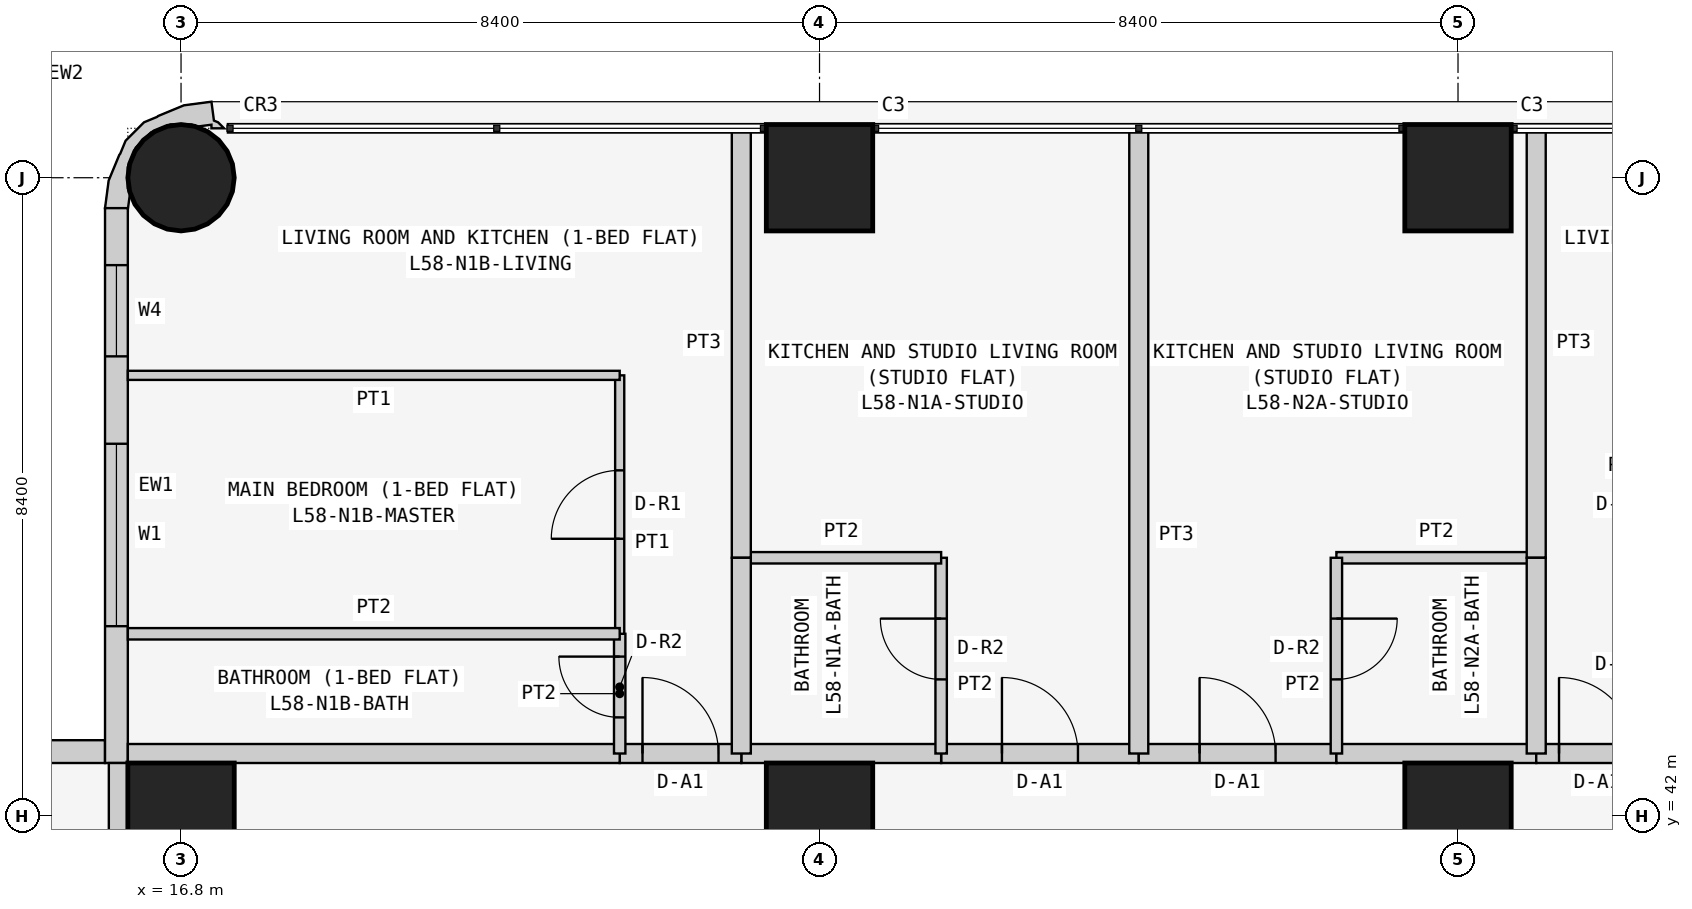
"""IFC4 building model, lengths in metres.
Left out: names, types, materials, properties, quantities, classifications, styles, units other than length and angle.
Written with IfcOpenShell. Run it as: python <this file> out.ifc"""

import sys

from ifc_helpers import new_model, si_unit, direction, frame, frame_2d, origin, origin_2d, place, context, subcontext, project, spatial, polyline, rectangle, circle, outline, extrude, element, fill, save


model = new_model("IFC4")
c1 = context("Model", 3, precision=1e-05, world=origin(), true_north=direction((0.0, 1.0)))
c2 = subcontext(c1, "Body", "Model", "MODEL_VIEW")
j1 = project(units=[si_unit("LENGTHUNIT", "METRE"), si_unit("PLANEANGLEUNIT", "RADIAN")], contexts=[c1])
p1 = place(None, origin())
s1 = spatial("IfcSite", under=j1, at=p1, CompositionType="ELEMENT")
p2 = place(p1, origin())
s2 = spatial("IfcBuilding", under=s1, at=p2, CompositionType="ELEMENT")
p3 = place(p2, frame((0.0, 0.0, 222.9)))
s3 = spatial("IfcBuildingStorey", under=s2, at=p3, CompositionType="ELEMENT", Elevation=222.9)
p4 = place(p3, frame((16.8, 42.0, 0.0), z_axis=(0.0, 0.0, 1.0), x_axis=(1.0, 0.0, 0.0)))
e1 = element("IfcColumn", 1, at=p4, inside=s3, PredefinedType="COLUMN", context=c2, shape_type="SweptSolid", body=[
    extrude(rectangle(XDim=1.4, YDim=1.4, at=origin_2d()), origin(), (0.0, 0.0, 1.0), 3.6),
])
p5 = place(p3, frame((16.8, 50.4, 0.0), z_axis=(0.0, 0.0, 1.0), x_axis=(1.0, 0.0, 0.0)))
e2 = element("IfcColumn", 2, at=p5, inside=s3, PredefinedType="COLUMN", context=c2, shape_type="SweptSolid", body=[
    extrude(circle(Radius=0.7, at=origin_2d()), origin(), (0.0, 0.0, 1.0), 3.6),
])
for number, where, z_axis, x_axis in (
    (3, (25.2, 42.0, 0.0), (0.0, 0.0, 1.0), (1.0, 0.0, 0.0)),
    (4, (25.2, 50.4, 0.0), (0.0, 0.0, 1.0), (1.0, 0.0, 0.0)),
    (5, (33.6, 42.0, 0.0), (0.0, 0.0, 1.0), (1.0, 0.0, 0.0)),
    (6, (33.6, 50.4, 0.0), (0.0, 0.0, 1.0), (1.0, 0.0, 0.0)),
):
    element("IfcColumn", number, at=place(p3, frame(where, z_axis=z_axis, x_axis=x_axis)), inside=s3, PredefinedType="COLUMN", context=c2, shape_type="SweptSolid", body=[
        extrude(rectangle(XDim=1.4, YDim=1.4, at=origin_2d()), origin(), (0.0, 0.0, 1.0), 3.6),
    ])
p6 = place(p3, frame((15.8, 42.85, 0.0), z_axis=(0.0, 0.0, 1.0), x_axis=(-1.0, 0.0, 0.0)))
e7 = element("IfcWall", 7, at=p6, inside=s3, PredefinedType="SOLIDWALL", context=c2, shape_type="SweptSolid", body=[
    extrude(rectangle(XDim=15.4, YDim=0.3, at=frame_2d((7.7, 0.0))), origin(), (0.0, 0.0, 1.0), 3.45),
])
p7 = place(p6, frame((1.2, 0.0, 0.9)))
e8 = element("IfcOpeningElement", 8, at=p7, cuts=e7, PredefinedType="OPENING", context=c2, shape_type="SweptSolid", body=[
    extrude(rectangle(XDim=1.8, YDim=1.5, at=frame_2d((0.9, 0.75))), frame((0.0, 0.16, 0.0), z_axis=(0.0, -1.0, 0.0), x_axis=(1.0, 0.0, 0.0)), (0.0, 0.0, 1.0), 0.32),
])
p8 = place(p6, frame((4.95, 0.0, 1.5)))
e9 = element("IfcOpeningElement", 9, at=p8, cuts=e7, PredefinedType="OPENING", context=c2, shape_type="SweptSolid", body=[
    extrude(rectangle(XDim=0.9, YDim=0.7, at=frame_2d((0.45, 0.35))), frame((0.0, 0.16, 0.0), z_axis=(0.0, -1.0, 0.0), x_axis=(1.0, 0.0, 0.0)), (0.0, 0.0, 1.0), 0.32),
])
p9 = place(p6, frame((8.5, 0.0, 0.9)))
e10 = element("IfcOpeningElement", 10, at=p9, cuts=e7, PredefinedType="OPENING", context=c2, shape_type="SweptSolid", body=[
    extrude(rectangle(XDim=1.8, YDim=1.5, at=frame_2d((0.9, 0.75))), frame((0.0, 0.16, 0.0), z_axis=(0.0, -1.0, 0.0), x_axis=(1.0, 0.0, 0.0)), (0.0, 0.0, 1.0), 0.32),
])
p10 = place(p6, frame((12.5, 0.0, 0.0)))
e11 = element("IfcOpeningElement", 11, at=p10, cuts=e7, PredefinedType="OPENING", context=c2, shape_type="SweptSolid", body=[
    extrude(rectangle(XDim=0.9, YDim=2.4, at=frame_2d((0.45, 1.2))), frame((0.0, 0.16, 0.0), z_axis=(0.0, -1.0, 0.0), x_axis=(1.0, 0.0, 0.0)), (0.0, 0.0, 1.0), 0.32),
])
p11 = place(p6, frame((13.5, 0.0, 0.9)))
e12 = element("IfcOpeningElement", 12, at=p11, cuts=e7, PredefinedType="OPENING", context=c2, shape_type="SweptSolid", body=[
    extrude(rectangle(XDim=1.2, YDim=1.5, at=frame_2d((0.6, 0.75))), frame((0.0, 0.16, 0.0), z_axis=(0.0, -1.0, 0.0), x_axis=(1.0, 0.0, 0.0)), (0.0, 0.0, 1.0), 0.32),
])
p12 = place(p3, frame((15.95, 50.0, 0.0), z_axis=(0.0, 0.0, 1.0), x_axis=(0.0, -1.0, 0.0)))
e13 = element("IfcWall", 13, at=p12, inside=s3, PredefinedType="SOLIDWALL", context=c2, shape_type="SweptSolid", body=[
    extrude(rectangle(XDim=7.3, YDim=0.3, at=frame_2d((3.65, 0.0))), origin(), (0.0, 0.0, 1.0), 3.45),
])
p13 = place(p12, frame((3.1, 0.0, 0.9)))
e14 = element("IfcOpeningElement", 14, at=p13, cuts=e13, PredefinedType="OPENING", context=c2, shape_type="SweptSolid", body=[
    extrude(rectangle(XDim=2.4, YDim=1.5, at=frame_2d((1.2, 0.75))), frame((0.0, 0.16, 0.0), z_axis=(0.0, -1.0, 0.0), x_axis=(1.0, 0.0, 0.0)), (0.0, 0.0, 1.0), 0.32),
])
p14 = place(p12, frame((0.75, 0.0, 0.9)))
e15 = element("IfcOpeningElement", 15, at=p14, cuts=e13, PredefinedType="OPENING", context=c2, shape_type="SweptSolid", body=[
    extrude(rectangle(XDim=1.2, YDim=1.5, at=frame_2d((0.6, 0.75))), frame((0.0, 0.16, 0.0), z_axis=(0.0, -1.0, 0.0), x_axis=(1.0, 0.0, 0.0)), (0.0, 0.0, 1.0), 0.32),
])
p15 = place(p3, frame((17.312, 50.988, 0.0), z_axis=(0.0, 0.0, 1.0), x_axis=(-0.439933741929, 0.898030234854, 0.0)))
e16 = element("IfcWall", 16, at=p15, inside=s3, PredefinedType="SOLIDWALL", context=c2, shape_type="SweptSolid", body=[
    extrude(outline(polyline([(0.138, -0.039), (0.182, -0.0), (0.419, -0.08), (0.536, 0.266), (0.559, 0.631), (0.555, 0.651), (0.566, 0.836), (0.456, 1.159), (0.333, 1.298), (0.324, 1.316), (0.082, 1.591), (-0.222, 1.793), (-0.39, 1.541), (-0.372, 1.532), (-0.195, 1.414), (-0.12, 1.41), (0.131, 1.287), (0.315, 1.078), (0.406, 0.814), (0.388, 0.536), (0.265, 0.285), (0.209, 0.236), (0.148, 0.053), (0.105, 0.074), (0.032, -0.076), (0.138, -0.039)])), origin(), (0.0, 0.0, 1.0), 3.45),
])
p16 = place(p3, frame((26.8, 42.825, 0.0), z_axis=(0.0, 0.0, 1.0), x_axis=(1.0, 0.0, 0.0)))
e17 = element("IfcWall", 17, at=p16, inside=s3, PredefinedType="PARTITIONING", context=c2, shape_type="SweptSolid", body=[
    extrude(rectangle(XDim=2.6, YDim=0.25, at=frame_2d((1.3, 0.0))), origin(), (0.0, 0.0, 1.0), 3.45),
])
p17 = place(p16, frame((0.8, 0.0, 0.0)))
e18 = element("IfcOpeningElement", 18, at=p17, cuts=e17, PredefinedType="OPENING", context=c2, shape_type="SweptSolid", body=[
    extrude(rectangle(XDim=1.0, YDim=2.1, at=frame_2d((0.5, 1.05))), frame((0.0, 0.135, 0.0), z_axis=(0.0, -1.0, 0.0), x_axis=(1.0, 0.0, 0.0)), (0.0, 0.0, 1.0), 0.27),
])
p18 = place(p3, frame((24.171, 42.825, 0.0), z_axis=(0.0, 0.0, 1.0), x_axis=(1.0, 0.0, 0.0)))
e19 = element("IfcWall", 19, at=p18, inside=s3, PredefinedType="PARTITIONING", context=c2, shape_type="SweptSolid", body=[
    extrude(rectangle(XDim=2.629, YDim=0.25, at=frame_2d((1.314, 0.0))), origin(), (0.0, 0.0, 1.0), 3.45),
])
p19 = place(p3, frame((22.571, 42.825, 0.0), z_axis=(0.0, 0.0, 1.0), x_axis=(1.0, 0.0, 0.0)))
e20 = element("IfcWall", 20, at=p19, inside=s3, PredefinedType="PARTITIONING", context=c2, shape_type="SweptSolid", body=[
    extrude(rectangle(XDim=1.6, YDim=0.25, at=frame_2d((0.8, 0.0))), origin(), (0.0, 0.0, 1.0), 3.45),
])
p20 = place(p19, frame((0.3, 0.0, 0.0)))
e21 = element("IfcOpeningElement", 21, at=p20, cuts=e20, PredefinedType="OPENING", context=c2, shape_type="SweptSolid", body=[
    extrude(rectangle(XDim=1.0, YDim=2.1, at=frame_2d((0.5, 1.05))), frame((0.0, 0.135, 0.0), z_axis=(0.0, -1.0, 0.0), x_axis=(1.0, 0.0, 0.0)), (0.0, 0.0, 1.0), 0.27),
])
p21 = place(p3, frame((16.1, 42.825, 0.0), z_axis=(0.0, 0.0, 1.0), x_axis=(1.0, 0.0, 0.0)))
e22 = element("IfcWall", 22, at=p21, inside=s3, PredefinedType="PARTITIONING", context=c2, shape_type="SweptSolid", body=[
    extrude(rectangle(XDim=6.471, YDim=0.25, at=frame_2d((3.235, 0.0))), origin(), (0.0, 0.0, 1.0), 3.45),
])
p22 = place(p3, frame((29.4, 42.825, 0.0), z_axis=(0.0, 0.0, 1.0), x_axis=(1.0, 0.0, 0.0)))
e23 = element("IfcWall", 23, at=p22, inside=s3, PredefinedType="PARTITIONING", context=c2, shape_type="SweptSolid", body=[
    extrude(rectangle(XDim=2.6, YDim=0.25, at=frame_2d((1.3, 0.0))), origin(), (0.0, 0.0, 1.0), 3.45),
])
p23 = place(p22, frame((0.8, 0.0, 0.0)))
e24 = element("IfcOpeningElement", 24, at=p23, cuts=e23, PredefinedType="OPENING", context=c2, shape_type="SweptSolid", body=[
    extrude(rectangle(XDim=1.0, YDim=2.1, at=frame_2d((0.5, 1.05))), frame((0.0, 0.135, 0.0), z_axis=(0.0, -1.0, 0.0), x_axis=(1.0, 0.0, 0.0)), (0.0, 0.0, 1.0), 0.27),
])
p24 = place(p3, frame((32.0, 42.825, 0.0), z_axis=(0.0, 0.0, 1.0), x_axis=(1.0, 0.0, 0.0)))
e25 = element("IfcWall", 25, at=p24, inside=s3, PredefinedType="PARTITIONING", context=c2, shape_type="SweptSolid", body=[
    extrude(rectangle(XDim=2.629, YDim=0.25, at=frame_2d((1.314, 0.0))), origin(), (0.0, 0.0, 1.0), 3.45),
])
p25 = place(p3, frame((34.629, 42.825, 0.0), z_axis=(0.0, 0.0, 1.0), x_axis=(1.0, 0.0, 0.0)))
e26 = element("IfcWall", 26, at=p25, inside=s3, PredefinedType="PARTITIONING", context=c2, shape_type="SweptSolid", body=[
    extrude(rectangle(XDim=1.6, YDim=0.25, at=frame_2d((0.8, 0.0))), origin(), (0.0, 0.0, 1.0), 3.45),
])
p26 = place(p25, frame((0.3, 0.0, 0.0)))
e27 = element("IfcOpeningElement", 27, at=p26, cuts=e26, PredefinedType="OPENING", context=c2, shape_type="SweptSolid", body=[
    extrude(rectangle(XDim=1.0, YDim=2.1, at=frame_2d((0.5, 1.05))), frame((0.0, 0.135, 0.0), z_axis=(0.0, -1.0, 0.0), x_axis=(1.0, 0.0, 0.0)), (0.0, 0.0, 1.0), 0.27),
])
p27 = place(p3, frame((15.975, 36.229, 0.0), z_axis=(0.0, 0.0, 1.0), x_axis=(0.0, 1.0, 0.0)))
e28 = element("IfcWall", 28, at=p27, inside=s3, PredefinedType="PARTITIONING", context=c2, shape_type="SweptSolid", body=[
    extrude(rectangle(XDim=6.471, YDim=0.25, at=frame_2d((3.235, 0.0))), origin(), (0.0, 0.0, 1.0), 3.45),
])
p28 = place(p3, frame((26.8, 42.825, 0.0), z_axis=(0.0, 0.0, 1.0), x_axis=(0.0, 1.0, 0.0)))
e29 = element("IfcWall", 29, at=p28, inside=s3, PredefinedType="PARTITIONING", context=c2, shape_type="SweptSolid", body=[
    extrude(rectangle(XDim=2.575, YDim=0.15, at=frame_2d((1.288, 0.0))), origin(), (0.0, 0.0, 1.0), 3.45),
])
p29 = place(p28, frame((0.975, 0.0, 0.0)))
e30 = element("IfcOpeningElement", 30, at=p29, cuts=e29, PredefinedType="OPENING", context=c2, shape_type="SweptSolid", body=[
    extrude(rectangle(XDim=0.8, YDim=2.1, at=frame_2d((0.4, 1.05))), frame((0.0, 0.085, 0.0), z_axis=(0.0, -1.0, 0.0), x_axis=(1.0, 0.0, 0.0)), (0.0, 0.0, 1.0), 0.17),
])
p30 = place(p3, frame((26.8, 45.4, 0.0), z_axis=(0.0, 0.0, 1.0), x_axis=(-1.0, 0.0, 0.0)))
e31 = element("IfcWall", 31, at=p30, inside=s3, PredefinedType="PARTITIONING", context=c2, shape_type="SweptSolid", body=[
    extrude(rectangle(XDim=2.629, YDim=0.15, at=frame_2d((1.314, 0.0))), origin(), (0.0, 0.0, 1.0), 3.45),
])
p31 = place(p3, frame((24.171, 45.4, 0.0), z_axis=(0.0, 0.0, 1.0), x_axis=(0.0, 1.0, 0.0)))
e32 = element("IfcWall", 32, at=p31, inside=s3, PredefinedType="PARTITIONING", context=c2, shape_type="SweptSolid", body=[
    extrude(rectangle(XDim=5.65, YDim=0.25, at=frame_2d((2.825, 0.0))), origin(), (0.0, 0.0, 1.0), 3.45),
])
p32 = place(p3, frame((29.4, 51.05, 0.0), z_axis=(0.0, 0.0, 1.0), x_axis=(0.0, -1.0, 0.0)))
e33 = element("IfcWall", 33, at=p32, inside=s3, PredefinedType="PARTITIONING", context=c2, shape_type="SweptSolid", body=[
    extrude(rectangle(XDim=8.225, YDim=0.25, at=frame_2d((4.113, 0.0))), origin(), (0.0, 0.0, 1.0), 2.848),
])
p33 = place(p3, frame((24.171, 45.4, 0.0), z_axis=(0.0, 0.0, 1.0), x_axis=(0.0, -1.0, 0.0)))
e34 = element("IfcWall", 34, at=p33, inside=s3, PredefinedType="PARTITIONING", context=c2, shape_type="SweptSolid", body=[
    extrude(rectangle(XDim=2.575, YDim=0.25, at=frame_2d((1.288, 0.0))), origin(), (0.0, 0.0, 1.0), 3.45),
])
p34 = place(p3, frame((22.571, 42.825, 0.0), z_axis=(0.0, 0.0, 1.0), x_axis=(0.0, 1.0, 0.0)))
e35 = element("IfcWall", 35, at=p34, inside=s3, PredefinedType="PARTITIONING", context=c2, shape_type="SweptSolid", body=[
    extrude(rectangle(XDim=1.575, YDim=0.15, at=frame_2d((0.788, 0.0))), origin(), (0.0, 0.0, 1.0), 3.45),
])
p35 = place(p34, frame((0.475, 0.0, 0.0)))
e36 = element("IfcOpeningElement", 36, at=p35, cuts=e35, PredefinedType="OPENING", context=c2, shape_type="SweptSolid", body=[
    extrude(rectangle(XDim=0.8, YDim=2.1, at=frame_2d((0.4, 1.05))), frame((0.0, 0.085, 0.0), z_axis=(0.0, -1.0, 0.0), x_axis=(1.0, 0.0, 0.0)), (0.0, 0.0, 1.0), 0.17),
])
p36 = place(p3, frame((22.571, 44.4, 0.0), z_axis=(0.0, 0.0, 1.0), x_axis=(0.0, 1.0, 0.0)))
e37 = element("IfcWall", 37, at=p36, inside=s3, PredefinedType="PARTITIONING", context=c2, shape_type="SweptSolid", body=[
    extrude(rectangle(XDim=3.4, YDim=0.12, at=frame_2d((1.7, 0.0))), origin(), (0.0, 0.0, 1.0), 3.45),
])
p37 = place(p36, frame((1.25, 0.0, 0.0)))
e38 = element("IfcOpeningElement", 38, at=p37, cuts=e37, PredefinedType="OPENING", context=c2, shape_type="SweptSolid", body=[
    extrude(rectangle(XDim=0.9, YDim=2.1, at=frame_2d((0.45, 1.05))), frame((0.0, 0.07, 0.0), z_axis=(0.0, -1.0, 0.0), x_axis=(1.0, 0.0, 0.0)), (0.0, 0.0, 1.0), 0.14),
])
p38 = place(p3, frame((22.571, 47.8, 0.0), z_axis=(0.0, 0.0, 1.0), x_axis=(-1.0, 0.0, 0.0)))
e39 = element("IfcWall", 39, at=p38, inside=s3, PredefinedType="PARTITIONING", context=c2, shape_type="SweptSolid", body=[
    extrude(rectangle(XDim=6.471, YDim=0.12, at=frame_2d((3.235, 0.0))), origin(), (0.0, 0.0, 1.0), 3.45),
])
p39 = place(p3, frame((22.571, 44.4, 0.0), z_axis=(0.0, 0.0, 1.0), x_axis=(-1.0, 0.0, 0.0)))
e40 = element("IfcWall", 40, at=p39, inside=s3, PredefinedType="PARTITIONING", context=c2, shape_type="SweptSolid", body=[
    extrude(rectangle(XDim=6.471, YDim=0.15, at=frame_2d((3.235, 0.0))), origin(), (0.0, 0.0, 1.0), 3.45),
])
p40 = place(p3, frame((34.629, 45.4, 0.0), z_axis=(0.0, 0.0, 1.0), x_axis=(-1.0, 0.0, 0.0)))
e41 = element("IfcWall", 41, at=p40, inside=s3, PredefinedType="PARTITIONING", context=c2, shape_type="SweptSolid", body=[
    extrude(rectangle(XDim=2.629, YDim=0.15, at=frame_2d((1.314, 0.0))), origin(), (0.0, 0.0, 1.0), 3.45),
])
p41 = place(p3, frame((32.0, 45.4, 0.0), z_axis=(0.0, 0.0, 1.0), x_axis=(0.0, -1.0, 0.0)))
e42 = element("IfcWall", 42, at=p41, inside=s3, PredefinedType="PARTITIONING", context=c2, shape_type="SweptSolid", body=[
    extrude(rectangle(XDim=2.575, YDim=0.15, at=frame_2d((1.288, 0.0))), origin(), (0.0, 0.0, 1.0), 3.45),
])
p42 = place(p41, frame((0.8, 0.0, 0.0)))
e43 = element("IfcOpeningElement", 43, at=p42, cuts=e42, PredefinedType="OPENING", context=c2, shape_type="SweptSolid", body=[
    extrude(rectangle(XDim=0.8, YDim=2.1, at=frame_2d((0.4, 1.05))), frame((0.0, 0.085, 0.0), z_axis=(0.0, -1.0, 0.0), x_axis=(1.0, 0.0, 0.0)), (0.0, 0.0, 1.0), 0.17),
])
p43 = place(p3, frame((34.629, 51.05, 0.0), z_axis=(0.0, 0.0, 1.0), x_axis=(0.0, -1.0, 0.0)))
e44 = element("IfcWall", 44, at=p43, inside=s3, PredefinedType="PARTITIONING", context=c2, shape_type="SweptSolid", body=[
    extrude(rectangle(XDim=5.65, YDim=0.25, at=frame_2d((2.825, 0.0))), origin(), (0.0, 0.0, 1.0), 3.45),
])
p44 = place(p3, frame((34.629, 45.4, 0.0), z_axis=(0.0, 0.0, 1.0), x_axis=(0.0, -1.0, 0.0)))
e45 = element("IfcWall", 45, at=p44, inside=s3, PredefinedType="PARTITIONING", context=c2, shape_type="SweptSolid", body=[
    extrude(rectangle(XDim=2.575, YDim=0.25, at=frame_2d((1.288, 0.0))), origin(), (0.0, 0.0, 1.0), 3.45),
])
p45 = place(p13, origin())
e46 = element("IfcWindow", 46, at=p45, inside=s3, PartitioningType="SINGLE_PANEL", PredefinedType="WINDOW", context=c2, shape_type="SweptSolid", body=[
    extrude(rectangle(XDim=2.4, YDim=1.5, at=frame_2d((1.2, 0.75))), frame((0.0, 0.03, 0.0), z_axis=(0.0, -1.0, 0.0), x_axis=(1.0, 0.0, 0.0)), (0.0, 0.0, 1.0), 0.06),
])
fill(e14, e46)
p46 = place(p14, origin())
e47 = element("IfcWindow", 47, at=p46, inside=s3, PartitioningType="SINGLE_PANEL", PredefinedType="WINDOW", context=c2, shape_type="SweptSolid", body=[
    extrude(rectangle(XDim=1.2, YDim=1.5, at=frame_2d((0.6, 0.75))), frame((0.0, 0.03, 0.0), z_axis=(0.0, -1.0, 0.0), x_axis=(1.0, 0.0, 0.0)), (0.0, 0.0, 1.0), 0.06),
])
fill(e15, e47)
p47 = place(p17, origin())
e48 = element("IfcDoor", 48, at=p47, inside=s3, OperationType="SINGLE_SWING_LEFT", PredefinedType="DOOR", context=c2, shape_type="SweptSolid", body=[
    extrude(rectangle(XDim=1.0, YDim=2.1, at=frame_2d((0.5, 1.05))), frame((0.0, 0.025, 0.0), z_axis=(0.0, -1.0, 0.0), x_axis=(1.0, 0.0, 0.0)), (0.0, 0.0, 1.0), 0.05),
])
fill(e18, e48)
p48 = place(p29, origin())
e49 = element("IfcDoor", 49, at=p48, inside=s3, OperationType="SINGLE_SWING_RIGHT", PredefinedType="DOOR", context=c2, shape_type="SweptSolid", body=[
    extrude(rectangle(XDim=0.8, YDim=2.1, at=frame_2d((0.4, 1.05))), frame((0.0, 0.025, 0.0), z_axis=(0.0, -1.0, 0.0), x_axis=(1.0, 0.0, 0.0)), (0.0, 0.0, 1.0), 0.05),
])
fill(e30, e49)
p49 = place(p20, origin())
e50 = element("IfcDoor", 50, at=p49, inside=s3, OperationType="SINGLE_SWING_LEFT", PredefinedType="DOOR", context=c2, shape_type="SweptSolid", body=[
    extrude(rectangle(XDim=1.0, YDim=2.1, at=frame_2d((0.5, 1.05))), frame((0.0, 0.025, 0.0), z_axis=(0.0, -1.0, 0.0), x_axis=(1.0, 0.0, 0.0)), (0.0, 0.0, 1.0), 0.05),
])
fill(e21, e50)
p50 = place(p35, origin())
e51 = element("IfcDoor", 51, at=p50, inside=s3, OperationType="SINGLE_SWING_RIGHT", PredefinedType="DOOR", context=c2, shape_type="SweptSolid", body=[
    extrude(rectangle(XDim=0.8, YDim=2.1, at=frame_2d((0.4, 1.05))), frame((0.0, 0.025, 0.0), z_axis=(0.0, -1.0, 0.0), x_axis=(1.0, 0.0, 0.0)), (0.0, 0.0, 1.0), 0.05),
])
fill(e36, e51)
p51 = place(p37, origin())
e52 = element("IfcDoor", 52, at=p51, inside=s3, OperationType="SINGLE_SWING_LEFT", PredefinedType="DOOR", context=c2, shape_type="SweptSolid", body=[
    extrude(rectangle(XDim=0.9, YDim=2.1, at=frame_2d((0.45, 1.05))), frame((0.0, 0.025, 0.0), z_axis=(0.0, -1.0, 0.0), x_axis=(1.0, 0.0, 0.0)), (0.0, 0.0, 1.0), 0.05),
])
fill(e38, e52)
p52 = place(p23, origin())
e53 = element("IfcDoor", 53, at=p52, inside=s3, OperationType="SINGLE_SWING_LEFT", PredefinedType="DOOR", context=c2, shape_type="SweptSolid", body=[
    extrude(rectangle(XDim=1.0, YDim=2.1, at=frame_2d((0.5, 1.05))), frame((0.0, 0.025, 0.0), z_axis=(0.0, -1.0, 0.0), x_axis=(1.0, 0.0, 0.0)), (0.0, 0.0, 1.0), 0.05),
])
fill(e24, e53)
p53 = place(p42, origin())
e54 = element("IfcDoor", 54, at=p53, inside=s3, OperationType="SINGLE_SWING_LEFT", PredefinedType="DOOR", context=c2, shape_type="SweptSolid", body=[
    extrude(rectangle(XDim=0.8, YDim=2.1, at=frame_2d((0.4, 1.05))), frame((0.0, 0.025, 0.0), z_axis=(0.0, -1.0, 0.0), x_axis=(1.0, 0.0, 0.0)), (0.0, 0.0, 1.0), 0.05),
])
fill(e43, e54)
p54 = place(p26, origin())
e55 = element("IfcDoor", 55, at=p54, inside=s3, OperationType="SINGLE_SWING_LEFT", PredefinedType="DOOR", context=c2, shape_type="SweptSolid", body=[
    extrude(rectangle(XDim=1.0, YDim=2.1, at=frame_2d((0.5, 1.05))), frame((0.0, 0.025, 0.0), z_axis=(0.0, -1.0, 0.0), x_axis=(1.0, 0.0, 0.0)), (0.0, 0.0, 1.0), 0.05),
])
fill(e27, e55)
save(model, sys.argv[1])
